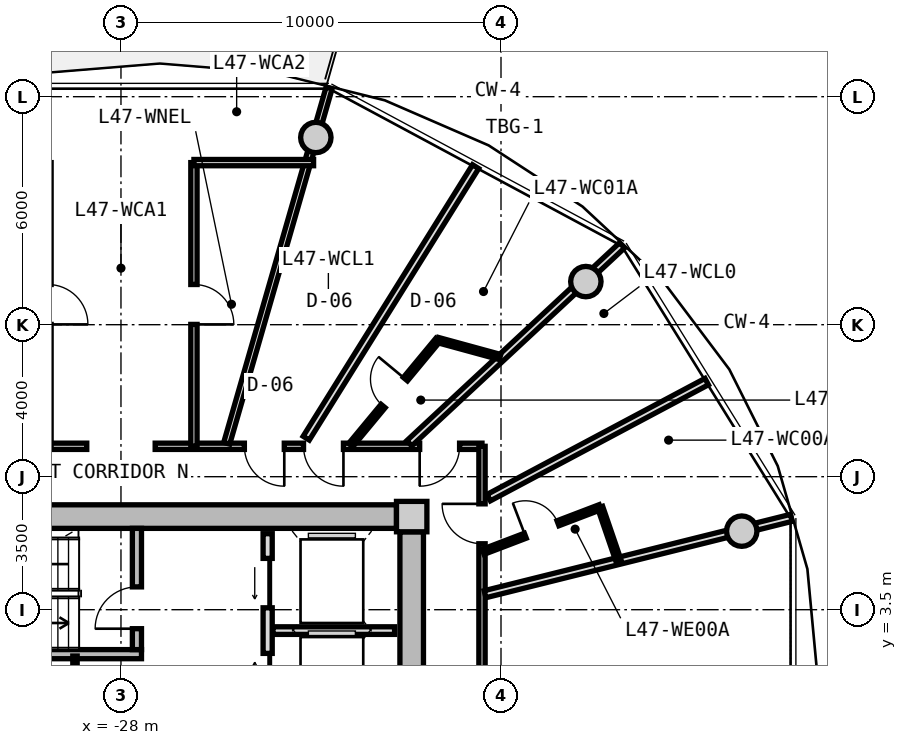
"""IFC4 building model, lengths in metres.
Left out: names, types, materials, properties, quantities, classifications, styles, units other than length and angle.
Written with IfcOpenShell. Run it as: python <this file> out.ifc"""

import sys

from ifc_helpers import new_model, si_unit, direction, frame, frame_2d, origin, origin_2d, place, context, subcontext, project, spatial, rectangle, circle, extrude, source, transform, mapped, element, fill, save


model = new_model("IFC4")
c1 = context("Model", 3, precision=1e-05, world=origin(), true_north=direction((0.0, 1.0)))
c2 = subcontext(c1, "Body", "Model", "MODEL_VIEW")
j1 = project(units=[si_unit("LENGTHUNIT", "METRE"), si_unit("PLANEANGLEUNIT", "RADIAN")], contexts=[c1])
p1 = place(None, origin())
s1 = spatial("IfcSite", under=j1, at=p1, CompositionType="ELEMENT")
p2 = place(p1, origin())
s2 = spatial("IfcBuilding", under=s1, at=p2, CompositionType="ELEMENT")
p3 = place(p2, frame((0.0, 0.0, 152.6)))
s3 = spatial("IfcBuildingStorey", under=s2, at=p3, CompositionType="ELEMENT", Elevation=152.6)
m1 = source(origin(), c2, "Body", "SweptSolid", [
    extrude(rectangle(XDim=0.8, YDim=0.8, at=origin_2d()), origin(), (0.0, 0.0, 1.0), 3.05),
])
p4 = place(p3, frame((-20.35, 5.95, 0.0), z_axis=(0.0, 0.0, 1.0), x_axis=(1.0, 0.0, 0.0)))
e1 = element("IfcColumn", 1, at=p4, inside=s3, PredefinedType="COLUMN", context=c2, shape_type="MappedRepresentation", body=[
    mapped(m1, transform((0.0, 0.0, 0.0), x_axis=(1.0, 0.0, 0.0), y_axis=(0.0, 1.0, 0.0), z_axis=(0.0, 0.0, 1.0), scale=1.0)),
])
m2 = source(origin(), c2, "Body", "SweptSolid", [
    extrude(rectangle(XDim=14.5, YDim=0.62, at=frame_2d((7.25, 0.0))), origin(), (0.0, 0.0, 1.0), 2.81),
])
p5 = place(p3, frame((-35.25, 5.95, 0.0), z_axis=(0.0, 0.0, 1.0), x_axis=(1.0, 0.0, 0.0)))
e2 = element("IfcWall", 2, at=p5, inside=s3, PredefinedType="SHEAR", context=c2, shape_type="MappedRepresentation", body=[
    mapped(m2, transform((0.0, 0.0, 0.0), x_axis=(1.0, 0.0, 0.0), y_axis=(0.0, 1.0, 0.0), z_axis=(0.0, 0.0, 1.0), scale=1.0)),
])
m3 = source(origin(), c2, "Body", "SweptSolid", [
    extrude(rectangle(XDim=11.1, YDim=0.62, at=frame_2d((5.55, 0.0))), origin(), (0.0, 0.0, 1.0), 2.81),
])
p6 = place(p3, frame((-20.35, 5.55, 0.0), z_axis=(0.0, 0.0, 1.0), x_axis=(0.0, -1.0, 0.0)))
e3 = element("IfcWall", 3, at=p6, inside=s3, PredefinedType="SHEAR", context=c2, shape_type="MappedRepresentation", body=[
    mapped(m3, transform((0.0, 0.0, 0.0), x_axis=(1.0, 0.0, 0.0), y_axis=(0.0, 1.0, 0.0), z_axis=(0.0, 0.0, 1.0), scale=1.0)),
])
p7 = place(p6, frame((5.65, 0.0, 0.0)))
e4 = element("IfcOpeningElement", 4, at=p7, cuts=e3, PredefinedType="OPENING", context=c2, shape_type="SweptSolid", body=[
    extrude(rectangle(XDim=1.2, YDim=2.15, at=frame_2d((0.6, 1.075))), frame((0.0, 0.32, 0.0), z_axis=(0.0, -1.0, 0.0), x_axis=(1.0, 0.0, 0.0)), (0.0, 0.0, 1.0), 0.64),
])
p8 = place(p6, frame((9.3, 0.0, 0.0)))
e5 = element("IfcOpeningElement", 5, at=p8, cuts=e3, PredefinedType="OPENING", context=c2, shape_type="SweptSolid", body=[
    extrude(rectangle(XDim=1.0, YDim=2.1, at=frame_2d((0.5, 1.05))), frame((0.0, 0.32, 0.0), z_axis=(0.0, -1.0, 0.0), x_axis=(1.0, 0.0, 0.0)), (0.0, 0.0, 1.0), 0.64),
])
m4 = source(origin(), c2, "Body", "SweptSolid", [
    extrude(circle(Radius=0.4, at=origin_2d()), origin(), (0.0, 0.0, 1.0), 3.05),
])
for number, where, z_axis, x_axis in (
    (6, (-11.665, 5.567, 0.0), (0.0, 0.0, 1.0), (1.0, 0.0, 0.0)),
    (7, (-15.767, 12.135, 0.0), (0.0, 0.0, 1.0), (1.0, 0.0, 0.0)),
    (8, (-22.873, 15.926, 0.0), (0.0, 0.0, 1.0), (1.0, 0.0, 0.0)),
):
    element("IfcColumn", number, at=place(p3, frame(where, z_axis=z_axis, x_axis=x_axis)), inside=s3, PredefinedType="COLUMN", context=c2, shape_type="MappedRepresentation", body=[
        mapped(m4, transform((0.0, 0.0, 0.0), x_axis=(1.0, 0.0, 0.0), y_axis=(0.0, 1.0, 0.0), z_axis=(0.0, 0.0, 1.0), scale=1.0)),
    ])
m5 = source(origin(), c2, "Body", "SweptSolid", [
    extrude(rectangle(XDim=7.88, YDim=0.24, at=frame_2d((3.94, 0.0))), origin(), (0.0, 0.0, 1.0), 2.81),
])
p9 = place(p3, frame((-35.34, 2.33, 0.0), z_axis=(0.0, 0.0, 1.0), x_axis=(1.0, 0.0, 0.0)))
e9 = element("IfcWall", 9, at=p9, inside=s3, PredefinedType="PARTITIONING", context=c2, shape_type="MappedRepresentation", body=[
    mapped(m5, transform((0.0, 0.0, 0.0), x_axis=(1.0, 0.0, 0.0), y_axis=(0.0, 1.0, 0.0), z_axis=(0.0, 0.0, 1.0), scale=1.0)),
])
m6 = source(origin(), c2, "Body", "SweptSolid", [
    extrude(rectangle(XDim=3.19, YDim=0.24, at=frame_2d((1.595, 0.0))), origin(), (0.0, 0.0, 1.0), 2.81),
])
p10 = place(p3, frame((-27.58, 2.45, 0.0), z_axis=(0.0, 0.0, 1.0), x_axis=(0.0, 1.0, 0.0)))
e10 = element("IfcWall", 10, at=p10, inside=s3, PredefinedType="PARTITIONING", context=c2, shape_type="MappedRepresentation", body=[
    mapped(m6, transform((0.0, 0.0, 0.0), x_axis=(1.0, 0.0, 0.0), y_axis=(0.0, 1.0, 0.0), z_axis=(0.0, 0.0, 1.0), scale=1.0)),
])
p11 = place(p10, frame((0.55, 0.0, 0.0)))
e11 = element("IfcOpeningElement", 11, at=p11, cuts=e10, PredefinedType="OPENING", context=c2, shape_type="SweptSolid", body=[
    extrude(rectangle(XDim=1.1, YDim=2.15, at=frame_2d((0.55, 1.075))), frame((0.0, 0.13, 0.0), z_axis=(0.0, -1.0, 0.0), x_axis=(1.0, 0.0, 0.0)), (0.0, 0.0, 1.0), 0.26),
])
m7 = source(origin(), c2, "Body", "SweptSolid", [
    extrude(rectangle(XDim=5.0, YDim=0.24, at=frame_2d((2.5, 0.0))), origin(), (0.0, 0.0, 1.0), 2.795),
])
p12 = place(p3, frame((-24.14, 0.5, 0.0), z_axis=(0.0, 0.0, 1.0), x_axis=(0.0, 1.0, 0.0)))
e12 = element("IfcWall", 12, at=p12, inside=s3, PredefinedType="PARTITIONING", context=c2, shape_type="MappedRepresentation", body=[
    mapped(m7, transform((0.0, 0.0, 0.0), x_axis=(1.0, 0.0, 0.0), y_axis=(0.0, 1.0, 0.0), z_axis=(0.0, 0.0, 1.0), scale=1.0)),
])
p13 = place(p12, frame((3.05, 0.0, 0.0)))
e13 = element("IfcOpeningElement", 13, at=p13, cuts=e12, PredefinedType="OPENING", context=c2, shape_type="SweptSolid", body=[
    extrude(rectangle(XDim=1.3, YDim=2.2, at=frame_2d((0.65, 1.1))), frame((0.0, 0.13, 0.0), z_axis=(0.0, -1.0, 0.0), x_axis=(1.0, 0.0, 0.0)), (0.0, 0.0, 1.0), 0.26),
])
p14 = place(p12, frame((0.55, 0.0, 0.0)))
e14 = element("IfcOpeningElement", 14, at=p14, cuts=e12, PredefinedType="OPENING", context=c2, shape_type="SweptSolid", body=[
    extrude(rectangle(XDim=1.3, YDim=2.2, at=frame_2d((0.65, 1.1))), frame((0.0, 0.13, 0.0), z_axis=(0.0, -1.0, 0.0), x_axis=(1.0, 0.0, 0.0)), (0.0, 0.0, 1.0), 0.26),
])
m8 = source(origin(), c2, "Body", "SweptSolid", [
    extrude(rectangle(XDim=3.2, YDim=0.2, at=frame_2d((1.6, 0.0))), origin(), (0.0, 0.0, 1.0), 2.795),
])
p15 = place(p3, frame((-24.0, 2.95, 0.0), z_axis=(0.0, 0.0, 1.0), x_axis=(1.0, 0.0, 0.0)))
e15 = element("IfcWall", 15, at=p15, inside=s3, PredefinedType="PARTITIONING", context=c2, shape_type="MappedRepresentation", body=[
    mapped(m8, transform((0.0, 0.0, 0.0), x_axis=(1.0, 0.0, 0.0), y_axis=(0.0, 1.0, 0.0), z_axis=(0.0, 0.0, 1.0), scale=1.0)),
])
m9 = source(origin(), c2, "Body", "SweptSolid", [
    extrude(rectangle(XDim=2.33, YDim=0.115, at=frame_2d((1.165, 0.0))), origin(), (0.0, 0.0, 1.0), 2.795),
])
p16 = place(p3, frame((-29.21, -0.05, 0.0), z_axis=(0.0, 0.0, 1.0), x_axis=(0.0, 1.0, 0.0)))
e16 = element("IfcWall", 16, at=p16, inside=s3, PredefinedType="PARTITIONING", context=c2, shape_type="MappedRepresentation", body=[
    mapped(m9, transform((0.0, 0.0, 0.0), x_axis=(1.0, 0.0, 0.0), y_axis=(0.0, 1.0, 0.0), z_axis=(0.0, 0.0, 1.0), scale=1.0)),
])
m10 = source(origin(), c2, "Body", "SweptSolid", [
    extrude(rectangle(XDim=8.6, YDim=0.165, at=frame_2d((4.3, 0.0))), origin(), (0.0, 0.0, 1.0), 2.795),
])
p17 = place(p3, frame((-37.5, 7.8, 0.0), z_axis=(0.0, 0.0, 1.0), x_axis=(1.0, 0.0, 0.0)))
e17 = element("IfcWall", 17, at=p17, inside=s3, PredefinedType="PARTITIONING", context=c2, shape_type="MappedRepresentation", body=[
    mapped(m10, transform((0.0, 0.0, 0.0), x_axis=(1.0, 0.0, 0.0), y_axis=(0.0, 1.0, 0.0), z_axis=(0.0, 0.0, 1.0), scale=1.0)),
])
p18 = place(p3, frame((-27.1, 7.8, 0.0), z_axis=(0.0, 0.0, 1.0), x_axis=(1.0, 0.0, 0.0)))
e18 = element("IfcWall", 18, at=p18, inside=s3, PredefinedType="PARTITIONING", context=c2, shape_type="MappedRepresentation", body=[
    mapped(m10, transform((0.0, 0.0, 0.0), x_axis=(1.0, 0.0, 0.0), y_axis=(0.0, 1.0, 0.0), z_axis=(0.0, 0.0, 1.0), scale=1.0)),
])
p19 = place(p18, frame((6.96, 0.0, 0.0)))
e19 = element("IfcOpeningElement", 19, at=p19, cuts=e18, PredefinedType="OPENING", context=c2, shape_type="SweptSolid", body=[
    extrude(rectangle(XDim=1.05, YDim=2.15, at=frame_2d((0.525, 1.075))), frame((0.0, 0.093, 0.0), z_axis=(0.0, -1.0, 0.0), x_axis=(1.0, 0.0, 0.0)), (0.0, 0.0, 1.0), 0.185),
])
p20 = place(p18, frame((3.904, 0.0, 0.0)))
e20 = element("IfcOpeningElement", 20, at=p20, cuts=e18, PredefinedType="OPENING", context=c2, shape_type="SweptSolid", body=[
    extrude(rectangle(XDim=1.05, YDim=2.15, at=frame_2d((0.525, 1.075))), frame((0.0, 0.093, 0.0), z_axis=(0.0, -1.0, 0.0), x_axis=(1.0, 0.0, 0.0)), (0.0, 0.0, 1.0), 0.185),
])
p21 = place(p18, frame((2.347, 0.0, 0.0)))
e21 = element("IfcOpeningElement", 21, at=p21, cuts=e18, PredefinedType="OPENING", context=c2, shape_type="SweptSolid", body=[
    extrude(rectangle(XDim=1.05, YDim=2.15, at=frame_2d((0.525, 1.075))), frame((0.0, 0.093, 0.0), z_axis=(0.0, -1.0, 0.0), x_axis=(1.0, 0.0, 0.0)), (0.0, 0.0, 1.0), 0.185),
])
m11 = source(origin(), c2, "Body", "SweptSolid", [
    extrude(rectangle(XDim=15.6, YDim=0.165, at=frame_2d((7.8, 0.0))), origin(), (0.0, 0.0, 1.0), 2.795),
])
p22 = place(p3, frame((-18.5, 7.8, 0.0), z_axis=(0.0, 0.0, 1.0), x_axis=(0.0, -1.0, 0.0)))
e22 = element("IfcWall", 22, at=p22, inside=s3, PredefinedType="PARTITIONING", context=c2, shape_type="MappedRepresentation", body=[
    mapped(m11, transform((0.0, 0.0, 0.0), x_axis=(1.0, 0.0, 0.0), y_axis=(0.0, 1.0, 0.0), z_axis=(0.0, 0.0, 1.0), scale=1.0)),
])
p23 = place(p22, frame((8.314, 0.0, 0.0)))
e23 = element("IfcOpeningElement", 23, at=p23, cuts=e22, PredefinedType="OPENING", context=c2, shape_type="SweptSolid", body=[
    extrude(rectangle(XDim=1.25, YDim=2.2, at=frame_2d((0.625, 1.1))), frame((0.0, 0.093, 0.0), z_axis=(0.0, -1.0, 0.0), x_axis=(1.0, 0.0, 0.0)), (0.0, 0.0, 1.0), 0.185),
])
p24 = place(p22, frame((1.515, 0.0, 0.0)))
e24 = element("IfcOpeningElement", 24, at=p24, cuts=e22, PredefinedType="OPENING", context=c2, shape_type="SweptSolid", body=[
    extrude(rectangle(XDim=1.05, YDim=2.15, at=frame_2d((0.525, 1.075))), frame((0.0, 0.093, 0.0), z_axis=(0.0, -1.0, 0.0), x_axis=(1.0, 0.0, 0.0)), (0.0, 0.0, 1.0), 0.185),
])
m12 = source(origin(), c2, "Body", "SweptSolid", [
    extrude(rectangle(XDim=9.73, YDim=0.165, at=frame_2d((4.865, 0.0))), origin(), (0.0, 0.0, 1.0), 2.345),
])
p25 = place(p3, frame((-25.217, 7.88, 0.0), z_axis=(0.0, 0.0, 1.0), x_axis=(0.27679492614, 0.960929013436, 0.0)))
e25 = element("IfcWall", 25, at=p25, inside=s3, PredefinedType="PARTITIONING", context=c2, shape_type="MappedRepresentation", body=[
    mapped(m12, transform((0.0, 0.0, 0.0), x_axis=(1.0, 0.0, 0.0), y_axis=(0.0, 1.0, 0.0), z_axis=(0.0, 0.0, 1.0), scale=1.0)),
])
m13 = source(origin(), c2, "Body", "SweptSolid", [
    extrude(rectangle(XDim=7.465, YDim=0.165, at=frame_2d((3.733, 0.0))), origin(), (0.0, 0.0, 1.0), 2.795),
])
p26 = place(p3, frame((-26.08, 7.8, 0.0), z_axis=(0.0, 0.0, 1.0), x_axis=(0.0, 1.0, 0.0)))
e26 = element("IfcWall", 26, at=p26, inside=s3, PredefinedType="PARTITIONING", context=c2, shape_type="MappedRepresentation", body=[
    mapped(m13, transform((0.0, 0.0, 0.0), x_axis=(1.0, 0.0, 0.0), y_axis=(0.0, 1.0, 0.0), z_axis=(0.0, 0.0, 1.0), scale=1.0)),
])
p27 = place(p26, frame((3.208, 0.0, 0.0)))
e27 = element("IfcOpeningElement", 27, at=p27, cuts=e26, PredefinedType="OPENING", context=c2, shape_type="SweptSolid", body=[
    extrude(rectangle(XDim=1.05, YDim=2.15, at=frame_2d((0.525, 1.075))), frame((0.0, 0.093, 0.0), z_axis=(0.0, -1.0, 0.0), x_axis=(1.0, 0.0, 0.0)), (0.0, 0.0, 1.0), 0.185),
])
m14 = source(origin(), c2, "Body", "SweptSolid", [
    extrude(rectangle(XDim=3.149, YDim=0.165, at=frame_2d((1.574, 0.0))), origin(), (0.0, 0.0, 1.0), 2.795),
])
p28 = place(p3, frame((-26.08, 15.265, 0.0), z_axis=(0.0, 0.0, 1.0), x_axis=(1.0, 0.0, 0.0)))
e28 = element("IfcWall", 28, at=p28, inside=s3, PredefinedType="PARTITIONING", context=c2, shape_type="MappedRepresentation", body=[
    mapped(m14, transform((0.0, 0.0, 0.0), x_axis=(1.0, 0.0, 0.0), y_axis=(0.0, 1.0, 0.0), z_axis=(0.0, 0.0, 1.0), scale=1.0)),
])
m15 = source(origin(), c2, "Body", "SweptSolid", [
    extrude(rectangle(XDim=8.305, YDim=0.19, at=frame_2d((4.153, 0.0))), origin(), (0.0, 0.0, 1.0), 2.345),
])
p29 = place(p3, frame((-18.42, 3.908, 0.0), z_axis=(0.0, 0.0, 1.0), x_axis=(0.970309994378, 0.241864662175, 0.0)))
e29 = element("IfcWall", 29, at=p29, inside=s3, PredefinedType="PARTITIONING", context=c2, shape_type="MappedRepresentation", body=[
    mapped(m15, transform((0.0, 0.0, 0.0), x_axis=(1.0, 0.0, 0.0), y_axis=(0.0, 1.0, 0.0), z_axis=(0.0, 0.0, 1.0), scale=1.0)),
])
m16 = source(origin(), c2, "Body", "SweptSolid", [
    extrude(rectangle(XDim=7.648, YDim=0.19, at=frame_2d((3.824, 0.0))), origin(), (0.0, 0.0, 1.0), 2.345),
])
p30 = place(p3, frame((-20.413, 7.88, 0.0), z_axis=(0.0, 0.0, 1.0), x_axis=(0.732182665826, 0.681108320213, 0.0)))
e30 = element("IfcWall", 30, at=p30, inside=s3, PredefinedType="PARTITIONING", context=c2, shape_type="MappedRepresentation", body=[
    mapped(m16, transform((0.0, 0.0, 0.0), x_axis=(1.0, 0.0, 0.0), y_axis=(0.0, 1.0, 0.0), z_axis=(0.0, 0.0, 1.0), scale=1.0)),
])
m17 = source(origin(), c2, "Body", "SweptSolid", [
    extrude(rectangle(XDim=6.499, YDim=0.19, at=frame_2d((3.25, 0.0))), origin(), (0.0, 0.0, 1.0), 2.795),
])
p31 = place(p3, frame((-18.324, 6.449, 0.0), z_axis=(0.0, 0.0, 1.0), x_axis=(0.882715595921, 0.469907625729, 0.0)))
e31 = element("IfcWall", 31, at=p31, inside=s3, PredefinedType="PARTITIONING", context=c2, shape_type="MappedRepresentation", body=[
    mapped(m17, transform((0.0, 0.0, 0.0), x_axis=(1.0, 0.0, 0.0), y_axis=(0.0, 1.0, 0.0), z_axis=(0.0, 0.0, 1.0), scale=1.0)),
])
m18 = source(origin(), c2, "Body", "SweptSolid", [
    extrude(rectangle(XDim=3.295, YDim=0.14, at=frame_2d((1.647, 0.0))), origin(), (0.0, 0.0, 1.0), 2.795),
])
p32 = place(p3, frame((-18.47, 5.023, 0.0), z_axis=(0.0, 0.0, 1.0), x_axis=(0.934202224769, 0.356743890258, 0.0)))
e32 = element("IfcWall", 32, at=p32, inside=s3, PredefinedType="PARTITIONING", context=c2, shape_type="MappedRepresentation", body=[
    mapped(m18, transform((0.0, 0.0, 0.0), x_axis=(1.0, 0.0, 0.0), y_axis=(0.0, 1.0, 0.0), z_axis=(0.0, 0.0, 1.0), scale=1.0)),
])
p33 = place(p32, frame((1.188, 0.0, 0.0)))
e33 = element("IfcOpeningElement", 33, at=p33, cuts=e32, PredefinedType="OPENING", context=c2, shape_type="SweptSolid", body=[
    extrude(rectangle(XDim=0.92, YDim=2.1, at=frame_2d((0.46, 1.05))), frame((0.0, 0.08, 0.0), z_axis=(0.0, -1.0, 0.0), x_axis=(1.0, 0.0, 0.0)), (0.0, 0.0, 1.0), 0.16),
])
m19 = source(origin(), c2, "Body", "SweptSolid", [
    extrude(rectangle(XDim=1.479, YDim=0.14, at=frame_2d((0.739, 0.0))), origin(), (0.0, 0.0, 1.0), 2.795),
])
p34 = place(p3, frame((-15.392, 6.198, 0.0), z_axis=(0.0, 0.0, 1.0), x_axis=(0.324438293903, -0.945906862989, 0.0)))
e34 = element("IfcWall", 34, at=p34, inside=s3, PredefinedType="PARTITIONING", context=c2, shape_type="MappedRepresentation", body=[
    mapped(m19, transform((0.0, 0.0, 0.0), x_axis=(1.0, 0.0, 0.0), y_axis=(0.0, 1.0, 0.0), z_axis=(0.0, 0.0, 1.0), scale=1.0)),
])
m20 = source(origin(), c2, "Body", "SweptSolid", [
    extrude(rectangle(XDim=8.422, YDim=0.19, at=frame_2d((4.211, 0.0))), origin(), (0.0, 0.0, 1.0), 2.795),
])
p35 = place(p3, frame((-23.125, 8.014, 0.0), z_axis=(0.0, 0.0, 1.0), x_axis=(0.52925352896, 0.848463730565, 0.0)))
e35 = element("IfcWall", 35, at=p35, inside=s3, PredefinedType="PARTITIONING", context=c2, shape_type="MappedRepresentation", body=[
    mapped(m20, transform((0.0, 0.0, 0.0), x_axis=(1.0, 0.0, 0.0), y_axis=(0.0, 1.0, 0.0), z_axis=(0.0, 0.0, 1.0), scale=1.0)),
])
m21 = source(origin(), c2, "Body", "SweptSolid", [
    extrude(rectangle(XDim=3.593, YDim=0.14, at=frame_2d((1.797, 0.0))), origin(), (0.0, 0.0, 1.0), 2.795),
])
p36 = place(p3, frame((-21.955, 7.83, 0.0), z_axis=(0.0, 0.0, 1.0), x_axis=(0.638271060163, 0.769811700196, 0.0)))
e36 = element("IfcWall", 36, at=p36, inside=s3, PredefinedType="PARTITIONING", context=c2, shape_type="MappedRepresentation", body=[
    mapped(m21, transform((0.0, 0.0, 0.0), x_axis=(1.0, 0.0, 0.0), y_axis=(0.0, 1.0, 0.0), z_axis=(0.0, 0.0, 1.0), scale=1.0)),
])
p37 = place(p36, frame((1.337, 0.0, 0.0)))
e37 = element("IfcOpeningElement", 37, at=p37, cuts=e36, PredefinedType="OPENING", context=c2, shape_type="SweptSolid", body=[
    extrude(rectangle(XDim=0.92, YDim=2.1, at=frame_2d((0.46, 1.05))), frame((0.0, 0.08, 0.0), z_axis=(0.0, -1.0, 0.0), x_axis=(1.0, 0.0, 0.0)), (0.0, 0.0, 1.0), 0.16),
])
m22 = source(origin(), c2, "Body", "SweptSolid", [
    extrude(rectangle(XDim=1.697, YDim=0.14, at=frame_2d((0.848, 0.0))), origin(), (0.0, 0.0, 1.0), 2.795),
])
p38 = place(p3, frame((-19.662, 10.596, 0.0), z_axis=(0.0, 0.0, 1.0), x_axis=(0.964667458123, -0.263470482671, 0.0)))
e38 = element("IfcWall", 38, at=p38, inside=s3, PredefinedType="PARTITIONING", context=c2, shape_type="MappedRepresentation", body=[
    mapped(m22, transform((0.0, 0.0, 0.0), x_axis=(1.0, 0.0, 0.0), y_axis=(0.0, 1.0, 0.0), z_axis=(0.0, 0.0, 1.0), scale=1.0)),
])
m23 = source(origin(), c2, "Body", "SweptSolid", [
    extrude(rectangle(XDim=1.1, YDim=2.15, at=frame_2d((0.55, 1.075))), frame((0.0, 0.025, 0.0), z_axis=(0.0, -1.0, 0.0), x_axis=(1.0, 0.0, 0.0)), (0.0, 0.0, 1.0), 0.05),
])
p39 = place(p11, origin())
e39 = element("IfcDoor", 39, at=p39, inside=s3, OperationType="SINGLE_SWING_LEFT", PredefinedType="DOOR", context=c2, shape_type="MappedRepresentation", body=[
    mapped(m23, transform((0.0, 0.0, 0.0), x_axis=(1.0, 0.0, 0.0), y_axis=(0.0, 1.0, 0.0), z_axis=(0.0, 0.0, 1.0), scale=1.0)),
])
fill(e11, e39)
m24 = source(origin(), c2, "Body", "SweptSolid", [
    extrude(rectangle(XDim=1.3, YDim=2.2, at=frame_2d((0.65, 1.1))), frame((0.0, 0.025, 0.0), z_axis=(0.0, -1.0, 0.0), x_axis=(1.0, 0.0, 0.0)), (0.0, 0.0, 1.0), 0.05),
])
p40 = place(p13, origin())
e40 = element("IfcDoor", 40, at=p40, inside=s3, OperationType="SLIDING_TO_LEFT", PredefinedType="DOOR", context=c2, shape_type="MappedRepresentation", body=[
    mapped(m24, transform((0.0, 0.0, 0.0), x_axis=(1.0, 0.0, 0.0), y_axis=(0.0, 1.0, 0.0), z_axis=(0.0, 0.0, 1.0), scale=1.0)),
])
fill(e13, e40)
p41 = place(p14, origin())
e41 = element("IfcDoor", 41, at=p41, inside=s3, OperationType="SLIDING_TO_RIGHT", PredefinedType="DOOR", context=c2, shape_type="MappedRepresentation", body=[
    mapped(m24, transform((0.0, 0.0, 0.0), x_axis=(1.0, 0.0, 0.0), y_axis=(0.0, 1.0, 0.0), z_axis=(0.0, 0.0, 1.0), scale=1.0)),
])
fill(e14, e41)
m25 = source(origin(), c2, "Body", "SweptSolid", [
    extrude(rectangle(XDim=1.05, YDim=2.15, at=frame_2d((0.525, 1.075))), frame((0.0, 0.025, 0.0), z_axis=(0.0, -1.0, 0.0), x_axis=(1.0, 0.0, 0.0)), (0.0, 0.0, 1.0), 0.05),
])
p42 = place(p27, frame((1.05, 0.0, 0.0), z_axis=(0.0, 0.0, 1.0), x_axis=(-1.0, 0.0, 0.0)))
e42 = element("IfcDoor", 42, at=p42, inside=s3, OperationType="SINGLE_SWING_RIGHT", PredefinedType="DOOR", context=c2, shape_type="MappedRepresentation", body=[
    mapped(m25, transform((0.0, 0.0, 0.0), x_axis=(1.0, 0.0, 0.0), y_axis=(0.0, 1.0, 0.0), z_axis=(0.0, 0.0, 1.0), scale=1.0)),
])
fill(e27, e42)
p43 = place(p24, frame((1.05, 0.0, 0.0), z_axis=(0.0, 0.0, 1.0), x_axis=(-1.0, 0.0, 0.0)))
e43 = element("IfcDoor", 43, at=p43, inside=s3, OperationType="SINGLE_SWING_RIGHT", PredefinedType="DOOR", context=c2, shape_type="MappedRepresentation", body=[
    mapped(m25, transform((0.0, 0.0, 0.0), x_axis=(1.0, 0.0, 0.0), y_axis=(0.0, 1.0, 0.0), z_axis=(0.0, 0.0, 1.0), scale=1.0)),
])
fill(e24, e43)
m26 = source(origin(), c2, "Body", "SweptSolid", [
    extrude(rectangle(XDim=0.92, YDim=2.1, at=frame_2d((0.46, 1.05))), frame((0.0, 0.025, 0.0), z_axis=(0.0, -1.0, 0.0), x_axis=(1.0, 0.0, 0.0)), (0.0, 0.0, 1.0), 0.05),
])
p44 = place(p33, origin())
e44 = element("IfcDoor", 44, at=p44, inside=s3, OperationType="SINGLE_SWING_LEFT", PredefinedType="DOOR", context=c2, shape_type="MappedRepresentation", body=[
    mapped(m26, transform((0.0, 0.0, 0.0), x_axis=(1.0, 0.0, 0.0), y_axis=(0.0, 1.0, 0.0), z_axis=(0.0, 0.0, 1.0), scale=1.0)),
])
fill(e33, e44)
p45 = place(p19, frame((1.05, 0.0, 0.0), z_axis=(0.0, 0.0, 1.0), x_axis=(-1.0, 0.0, 0.0)))
e45 = element("IfcDoor", 45, at=p45, inside=s3, OperationType="SINGLE_SWING_RIGHT", PredefinedType="DOOR", context=c2, shape_type="MappedRepresentation", body=[
    mapped(m25, transform((0.0, 0.0, 0.0), x_axis=(1.0, 0.0, 0.0), y_axis=(0.0, 1.0, 0.0), z_axis=(0.0, 0.0, 1.0), scale=1.0)),
])
fill(e19, e45)
p46 = place(p20, frame((1.05, 0.0, 0.0), z_axis=(0.0, 0.0, 1.0), x_axis=(-1.0, 0.0, 0.0)))
e46 = element("IfcDoor", 46, at=p46, inside=s3, OperationType="SINGLE_SWING_LEFT", PredefinedType="DOOR", context=c2, shape_type="MappedRepresentation", body=[
    mapped(m25, transform((0.0, 0.0, 0.0), x_axis=(1.0, 0.0, 0.0), y_axis=(0.0, 1.0, 0.0), z_axis=(0.0, 0.0, 1.0), scale=1.0)),
])
fill(e20, e46)
p47 = place(p37, origin())
e47 = element("IfcDoor", 47, at=p47, inside=s3, OperationType="SINGLE_SWING_RIGHT", PredefinedType="DOOR", context=c2, shape_type="MappedRepresentation", body=[
    mapped(m26, transform((0.0, 0.0, 0.0), x_axis=(1.0, 0.0, 0.0), y_axis=(0.0, 1.0, 0.0), z_axis=(0.0, 0.0, 1.0), scale=1.0)),
])
fill(e37, e47)
p48 = place(p21, frame((1.05, 0.0, 0.0), z_axis=(0.0, 0.0, 1.0), x_axis=(-1.0, 0.0, 0.0)))
e48 = element("IfcDoor", 48, at=p48, inside=s3, OperationType="SINGLE_SWING_LEFT", PredefinedType="DOOR", context=c2, shape_type="MappedRepresentation", body=[
    mapped(m25, transform((0.0, 0.0, 0.0), x_axis=(1.0, 0.0, 0.0), y_axis=(0.0, 1.0, 0.0), z_axis=(0.0, 0.0, 1.0), scale=1.0)),
])
fill(e21, e48)
save(model, sys.argv[1])
